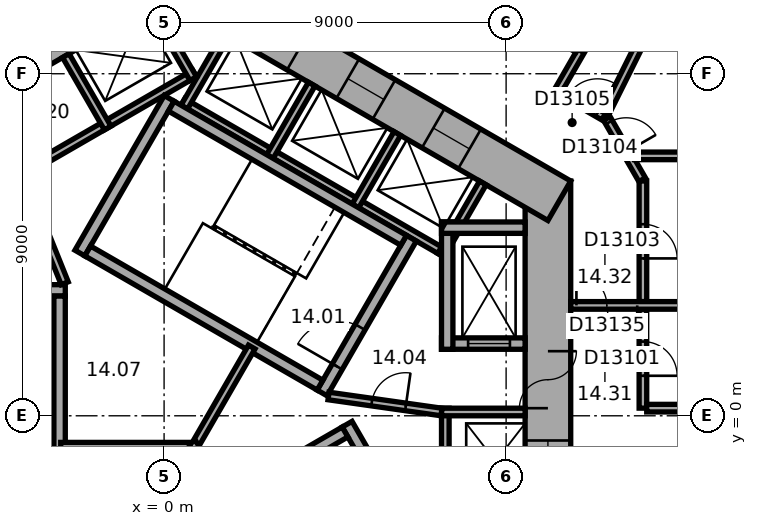
"""IFC4 building model, lengths in metres.
Left out: names, types, materials, properties, quantities, classifications, styles, units other than length and angle.
Written with IfcOpenShell. Run it as: python <this file> out.ifc"""

import sys

from ifc_helpers import new_model, si_unit, direction, frame, frame_2d, origin, place, context, subcontext, project, spatial, rectangle, extrude, element, fill, save


model = new_model("IFC4")
c1 = context("Model", 3, precision=1e-05, world=origin(), true_north=direction((0.0, 1.0)))
c2 = subcontext(c1, "Body", "Model", "MODEL_VIEW")
j1 = project(units=[si_unit("LENGTHUNIT", "METRE"), si_unit("PLANEANGLEUNIT", "RADIAN")], contexts=[c1])
p1 = place(None, origin())
s1 = spatial("IfcSite", under=j1, at=p1, CompositionType="ELEMENT")
p2 = place(p1, origin())
s2 = spatial("IfcBuilding", under=s1, at=p2, CompositionType="ELEMENT")
p3 = place(p2, frame((0.0, 0.0, 67.1)))
s3 = spatial("IfcBuildingStorey", under=s2, at=p3, CompositionType="ELEMENT", Elevation=67.1)
p4 = place(p3, frame((10.1, -6.177, 0.0), z_axis=(0.0, 0.0, 1.0), x_axis=(0.0, 1.0, 0.0)))
e1 = element("IfcWall", 1, at=p4, inside=s3, PredefinedType="SHEAR", context=c2, shape_type="SweptSolid", body=[
    extrude(rectangle(XDim=12.355, YDim=1.2, at=frame_2d((6.177, 0.0))), origin(), (0.0, 0.0, 1.0), 3.3),
])
p5 = place(p4, frame((6.378, 0.0, 0.0)))
e2 = element("IfcOpeningElement", 2, at=p5, cuts=e1, PredefinedType="OPENING", context=c2, shape_type="SweptSolid", body=[
    extrude(rectangle(XDim=1.5, YDim=2.1, at=frame_2d((0.75, 1.05))), frame((0.0, 0.61, 0.0), z_axis=(0.0, -1.0, 0.0), x_axis=(1.0, 0.0, 0.0)), (0.0, 0.0, 1.0), 1.22),
])
p6 = place(p4, frame((1.828, 0.0, 0.0)))
e3 = element("IfcOpeningElement", 3, at=p6, cuts=e1, PredefinedType="OPENING", context=c2, shape_type="SweptSolid", body=[
    extrude(rectangle(XDim=1.1, YDim=2.1, at=frame_2d((0.55, 1.05))), frame((0.0, 0.61, 0.0), z_axis=(0.0, -1.0, 0.0), x_axis=(1.0, 0.0, 0.0)), (0.0, 0.0, 1.0), 1.22),
])
p7 = place(p4, frame((4.427, 0.0, 0.0)))
e4 = element("IfcOpeningElement", 4, at=p7, cuts=e1, PredefinedType="OPENING", context=c2, shape_type="SweptSolid", body=[
    extrude(rectangle(XDim=1.1, YDim=2.1, at=frame_2d((0.55, 1.05))), frame((0.0, 0.61, 0.0), z_axis=(0.0, -1.0, 0.0), x_axis=(1.0, 0.0, 0.0)), (0.0, 0.0, 1.0), 1.22),
])
p8 = place(p3, frame((10.4, 5.658, 0.0), z_axis=(0.0, 0.0, 1.0), x_axis=(-0.866021384402, 0.500006961711, 0.0)))
e5 = element("IfcWall", 5, at=p8, inside=s3, PredefinedType="SHEAR", context=c2, shape_type="SweptSolid", body=[
    extrude(rectangle(XDim=12.355, YDim=1.2, at=frame_2d((6.178, 0.0))), origin(), (0.0, 0.0, 1.0), 3.3),
])
p9 = place(p8, frame((2.728, 0.0, 0.0)))
e6 = element("IfcOpeningElement", 6, at=p9, cuts=e5, PredefinedType="OPENING", context=c2, shape_type="SweptSolid", body=[
    extrude(rectangle(XDim=1.1, YDim=2.1, at=frame_2d((0.55, 1.05))), frame((0.0, 0.61, 0.0), z_axis=(0.0, -1.0, 0.0), x_axis=(1.0, 0.0, 0.0)), (0.0, 0.0, 1.0), 1.22),
])
p10 = place(p8, frame((5.328, 0.0, 0.0)))
e7 = element("IfcOpeningElement", 7, at=p10, cuts=e5, PredefinedType="OPENING", context=c2, shape_type="SweptSolid", body=[
    extrude(rectangle(XDim=1.1, YDim=2.1, at=frame_2d((0.55, 1.05))), frame((0.0, 0.61, 0.0), z_axis=(0.0, -1.0, 0.0), x_axis=(1.0, 0.0, 0.0)), (0.0, 0.0, 1.0), 1.22),
])
p11 = place(p8, frame((7.928, 0.0, 0.0)))
e8 = element("IfcOpeningElement", 8, at=p11, cuts=e5, PredefinedType="OPENING", context=c2, shape_type="SweptSolid", body=[
    extrude(rectangle(XDim=1.1, YDim=2.1, at=frame_2d((0.55, 1.05))), frame((0.0, 0.61, 0.0), z_axis=(0.0, -1.0, 0.0), x_axis=(1.0, 0.0, 0.0)), (0.0, 0.0, 1.0), 1.22),
])
p12 = place(p3, frame((0.3, 11.836, 0.0), z_axis=(0.0, 0.0, 1.0), x_axis=(-0.866021384402, -0.500006961711, 0.0)))
e9 = element("IfcWall", 9, at=p12, inside=s3, PredefinedType="SHEAR", context=c2, shape_type="SweptSolid", body=[
    extrude(rectangle(XDim=12.355, YDim=1.2, at=frame_2d((6.178, 0.0))), origin(), (0.0, 0.0, 1.0), 3.3),
])
p13 = place(p12, frame((6.378, 0.0, 0.0)))
e10 = element("IfcOpeningElement", 10, at=p13, cuts=e9, PredefinedType="OPENING", context=c2, shape_type="SweptSolid", body=[
    extrude(rectangle(XDim=1.5, YDim=2.1, at=frame_2d((0.75, 1.05))), frame((0.0, 0.61, 0.0), z_axis=(0.0, -1.0, 0.0), x_axis=(1.0, 0.0, 0.0)), (0.0, 0.0, 1.0), 1.22),
])
p14 = place(p12, frame((1.828, 0.0, 0.0)))
e11 = element("IfcOpeningElement", 11, at=p14, cuts=e9, PredefinedType="OPENING", context=c2, shape_type="SweptSolid", body=[
    extrude(rectangle(XDim=1.1, YDim=2.1, at=frame_2d((0.55, 1.05))), frame((0.0, 0.61, 0.0), z_axis=(0.0, -1.0, 0.0), x_axis=(1.0, 0.0, 0.0)), (0.0, 0.0, 1.0), 1.22),
])
p15 = place(p3, frame((7.4, -5.2, 0.0), z_axis=(0.0, 0.0, 1.0), x_axis=(0.0, 1.0, 0.0)))
e12 = element("IfcWall", 12, at=p15, inside=s3, PredefinedType="PARTITIONING", context=c2, shape_type="SweptSolid", body=[
    extrude(rectangle(XDim=5.4, YDim=0.2, at=frame_2d((2.7, 0.0))), origin(), (0.0, 0.0, 1.0), 3.05),
])
p16 = place(p3, frame((7.3, 0.1, 0.0), z_axis=(0.0, 0.0, 1.0), x_axis=(1.0, 0.0, 0.0)))
e13 = element("IfcWall", 13, at=p16, inside=s3, PredefinedType="PARTITIONING", context=c2, shape_type="SweptSolid", body=[
    extrude(rectangle(XDim=2.2, YDim=0.2, at=frame_2d((1.1, 0.0))), origin(), (0.0, 0.0, 1.0), 3.05),
])
p17 = place(p3, frame((7.424, 4.259, 0.0), z_axis=(0.0, 0.0, 1.0), x_axis=(-0.866026010844, 0.49999894854, 0.0)))
e14 = element("IfcWall", 14, at=p17, inside=s3, PredefinedType="PARTITIONING", context=c2, shape_type="SweptSolid", body=[
    extrude(rectangle(XDim=8.0, YDim=0.2, at=frame_2d((4.0, 0.0))), origin(), (0.0, 0.0, 1.0), 3.05),
])
for number, where, z_axis, x_axis in (
    (15, (7.287, 4.222, 0.0), (0.0, 0.0, 1.0), (0.5, 0.866, 0.0)),
    (16, (5.036, 5.522, 0.0), (0.0, 0.0, 1.0), (0.5, 0.866, 0.0)),
    (17, (2.784, 6.822, 0.0), (0.0, 0.0, 1.0), (0.5, 0.866, 0.0)),
    (18, (0.532, 8.122, 0.0), (0.0, 0.0, 1.0), (0.5, 0.866, 0.0)),
):
    element("IfcWall", number, at=place(p3, frame(where, z_axis=z_axis, x_axis=x_axis)), inside=s3, PredefinedType="PARTITIONING", context=c2, shape_type="SweptSolid", body=[
        extrude(rectangle(XDim=2.2, YDim=0.2, at=frame_2d((1.1, 0.0))), origin(), (0.0, 0.0, 1.0), 3.05),
    ])
p18 = place(p3, frame((0.803, 9.009, 0.0), z_axis=(0.0, 0.0, 1.0), x_axis=(-0.866028230842, -0.499995103361, 0.0)))
e19 = element("IfcWall", 19, at=p18, inside=s3, PredefinedType="PARTITIONING", context=c2, shape_type="SweptSolid", body=[
    extrude(rectangle(XDim=5.4, YDim=0.2, at=frame_2d((2.7, 0.0))), origin(), (0.0, 0.0, 1.0), 3.05),
])
p19 = place(p3, frame((0.767, 8.872, 0.0), z_axis=(0.0, 0.0, 1.0), x_axis=(-0.499994660107, 0.866028486751, 0.0)))
e20 = element("IfcWall", 20, at=p19, inside=s3, PredefinedType="PARTITIONING", context=c2, shape_type="SweptSolid", body=[
    extrude(rectangle(XDim=2.2, YDim=0.2, at=frame_2d((1.1, 0.0))), origin(), (0.0, 0.0, 1.0), 3.05),
])
p20 = place(p3, frame((-1.485, 7.572, 0.0), z_axis=(0.0, 0.0, 1.0), x_axis=(-0.50002983664, 0.866008176907, 0.0)))
e21 = element("IfcWall", 21, at=p20, inside=s3, PredefinedType="PARTITIONING", context=c2, shape_type="SweptSolid", body=[
    extrude(rectangle(XDim=2.2, YDim=0.2, at=frame_2d((1.1, 0.0))), origin(), (0.0, 0.0, 1.0), 3.05),
])
p21 = place(p3, frame((4.158, 0.602, 0.0), z_axis=(0.0, 0.0, 1.0), x_axis=(0.499977259774, 0.866038532462, 0.0)))
e22 = element("IfcWall", 22, at=p21, inside=s3, PredefinedType="SHEAR", context=c2, shape_type="SweptSolid", body=[
    extrude(rectangle(XDim=4.7, YDim=0.3, at=frame_2d((2.35, 0.0))), origin(), (0.0, 0.0, 1.0), 3.05),
])
p22 = place(p21, frame((0.8, 0.0, 0.0)))
e23 = element("IfcOpeningElement", 23, at=p22, cuts=e22, PredefinedType="OPENING", context=c2, shape_type="SweptSolid", body=[
    extrude(rectangle(XDim=1.2, YDim=2.1, at=frame_2d((0.6, 1.05))), frame((0.0, 0.16, 0.0), z_axis=(0.0, -1.0, 0.0), x_axis=(1.0, 0.0, 0.0)), (0.0, 0.0, 1.0), 0.32),
])
p23 = place(p3, frame((-2.216, 4.282, 0.0), z_axis=(0.0, 0.0, 1.0), x_axis=(0.499977259774, 0.866038532462, 0.0)))
e24 = element("IfcWall", 24, at=p23, inside=s3, PredefinedType="SHEAR", context=c2, shape_type="SweptSolid", body=[
    extrude(rectangle(XDim=4.7, YDim=0.3, at=frame_2d((2.35, 0.0))), origin(), (0.0, 0.0, 1.0), 3.05),
])
for number, where, z_axis, x_axis in (
    (25, (4.103, 0.807, 0.0), (0.0, 0.0, 1.0), (-0.866, 0.5, 0.0)),
    (26, (6.303, 4.617, 0.0), (0.0, 0.0, 1.0), (-0.866, 0.5, 0.0)),
):
    element("IfcWall", number, at=place(p3, frame(where, z_axis=z_axis, x_axis=x_axis)), inside=s3, PredefinedType="SHEAR", context=c2, shape_type="SweptSolid", body=[
        extrude(rectangle(XDim=7.06, YDim=0.3, at=frame_2d((3.53, 0.0))), origin(), (0.0, 0.0, 1.0), 3.05),
    ])
p24 = place(p3, frame((-2.6, 3.3, 0.0), z_axis=(0.0, 0.0, 1.0), x_axis=(-1.0, 0.0, 0.0)))
e27 = element("IfcWall", 27, at=p24, inside=s3, PredefinedType="SHEAR", context=c2, shape_type="SweptSolid", body=[
    extrude(rectangle(XDim=4.7, YDim=0.3, at=frame_2d((2.35, 0.0))), origin(), (0.0, 0.0, 1.0), 3.05),
])
p25 = place(p24, frame((0.8, 0.0, 0.0)))
e28 = element("IfcOpeningElement", 28, at=p25, cuts=e27, PredefinedType="OPENING", context=c2, shape_type="SweptSolid", body=[
    extrude(rectangle(XDim=1.2, YDim=2.1, at=frame_2d((0.6, 1.05))), frame((0.0, 0.16, 0.0), z_axis=(0.0, -1.0, 0.0), x_axis=(1.0, 0.0, 0.0)), (0.0, 0.0, 1.0), 0.32),
])
p26 = place(p3, frame((-2.75, 3.15, 0.0), z_axis=(0.0, 0.0, 1.0), x_axis=(0.0, -1.0, 0.0)))
e29 = element("IfcWall", 29, at=p26, inside=s3, PredefinedType="SHEAR", context=c2, shape_type="SweptSolid", body=[
    extrude(rectangle(XDim=7.06, YDim=0.3, at=frame_2d((3.53, 0.0))), origin(), (0.0, 0.0, 1.0), 3.05),
])
p27 = place(p3, frame((4.816, -0.222, 0.0), z_axis=(0.0, 0.0, 1.0), x_axis=(0.499977259774, -0.866038532462, 0.0)))
e30 = element("IfcWall", 30, at=p27, inside=s3, PredefinedType="SHEAR", context=c2, shape_type="SweptSolid", body=[
    extrude(rectangle(XDim=4.7, YDim=0.3, at=frame_2d((2.35, 0.0))), origin(), (0.0, 0.0, 1.0), 3.05),
])
p28 = place(p3, frame((-1.353, -3.957, 0.0), z_axis=(0.0, 0.0, 1.0), x_axis=(0.866027801685, 0.499995846692, 0.0)))
e31 = element("IfcWall", 31, at=p28, inside=s3, PredefinedType="SHEAR", context=c2, shape_type="SweptSolid", body=[
    extrude(rectangle(XDim=7.06, YDim=0.3, at=frame_2d((3.53, 0.0))), origin(), (0.0, 0.0, 1.0), 3.05),
])
p29 = place(p3, frame((7.3, 1.9, 0.0), z_axis=(0.0, 0.0, 1.0), x_axis=(1.0, 0.0, 0.0)))
e32 = element("IfcWall", 32, at=p29, inside=s3, PredefinedType="SHEAR", context=c2, shape_type="SweptSolid", body=[
    extrude(rectangle(XDim=2.2, YDim=0.3, at=frame_2d((1.1, 0.0))), origin(), (0.0, 0.0, 1.0), 3.05),
])
p30 = place(p29, frame((0.7, 0.0, 0.0)))
e33 = element("IfcOpeningElement", 33, at=p30, cuts=e32, PredefinedType="OPENING", context=c2, shape_type="SweptSolid", body=[
    extrude(rectangle(XDim=1.1, YDim=2.1, at=frame_2d((0.55, 1.05))), frame((0.0, 0.16, 0.0), z_axis=(0.0, -1.0, 0.0), x_axis=(1.0, 0.0, 0.0)), (0.0, 0.0, 1.0), 0.32),
])
p31 = place(p3, frame((7.45, 1.75, 0.0), z_axis=(0.0, 0.0, 1.0), x_axis=(0.0, 1.0, 0.0)))
e34 = element("IfcWall", 34, at=p31, inside=s3, PredefinedType="SHEAR", context=c2, shape_type="SweptSolid", body=[
    extrude(rectangle(XDim=3.35, YDim=0.3, at=frame_2d((1.675, 0.0))), origin(), (0.0, 0.0, 1.0), 3.05),
])
p32 = place(p3, frame((7.3, 4.95, 0.0), z_axis=(0.0, 0.0, 1.0), x_axis=(1.0, 0.0, 0.0)))
e35 = element("IfcWall", 35, at=p32, inside=s3, PredefinedType="SHEAR", context=c2, shape_type="SweptSolid", body=[
    extrude(rectangle(XDim=2.2, YDim=0.3, at=frame_2d((1.1, 0.0))), origin(), (0.0, 0.0, 1.0), 3.05),
])
p33 = place(p3, frame((4.327, 0.521, 0.0), z_axis=(0.0, 0.0, 1.0), x_axis=(0.990124376366, -0.14019172346, 0.0)))
e36 = element("IfcWall", 36, at=p33, inside=s3, PredefinedType="PARTITIONING", context=c2, shape_type="SweptSolid", body=[
    extrude(rectangle(XDim=3.002, YDim=0.2, at=frame_2d((1.501, 0.0))), origin(), (0.0, 0.0, 1.0), 3.05),
])
p34 = place(p33, frame((1.15, 0.0, 0.0)))
e37 = element("IfcOpeningElement", 37, at=p34, cuts=e36, PredefinedType="OPENING", context=c2, shape_type="SweptSolid", body=[
    extrude(rectangle(XDim=0.9, YDim=2.1, at=frame_2d((0.45, 1.05))), frame((0.0, 0.11, 0.0), z_axis=(0.0, -1.0, 0.0), x_axis=(1.0, 0.0, 0.0)), (0.0, 0.0, 1.0), 0.22),
])
p35 = place(p3, frame((-2.615, 3.487, 0.0), z_axis=(0.0, 0.0, 1.0), x_axis=(-0.373576831041, 0.92759924068, 0.0)))
e38 = element("IfcWall", 38, at=p35, inside=s3, PredefinedType="PARTITIONING", context=c2, shape_type="SweptSolid", body=[
    extrude(rectangle(XDim=3.002, YDim=0.2, at=frame_2d((1.501, 0.0))), origin(), (0.0, 0.0, 1.0), 3.05),
])
p36 = place(p35, frame((1.15, 0.0, 0.0)))
e39 = element("IfcOpeningElement", 39, at=p36, cuts=e38, PredefinedType="OPENING", context=c2, shape_type="SweptSolid", body=[
    extrude(rectangle(XDim=0.9, YDim=2.1, at=frame_2d((0.45, 1.05))), frame((0.0, 0.11, 0.0), z_axis=(0.0, -1.0, 0.0), x_axis=(1.0, 0.0, 0.0)), (0.0, 0.0, 1.0), 0.22),
])
p37 = place(p3, frame((0.92, -0.8, 0.0), z_axis=(0.0, 0.0, 1.0), x_axis=(-1.0, 0.0, 0.0)))
e40 = element("IfcWall", 40, at=p37, inside=s3, PredefinedType="PARTITIONING", context=c2, shape_type="SweptSolid", body=[
    extrude(rectangle(XDim=3.64, YDim=0.2, at=frame_2d((1.82, 0.0))), origin(), (0.0, 0.0, 1.0), 3.05),
])
p38 = place(p3, frame((0.74, -0.904, 0.0), z_axis=(0.0, 0.0, 1.0), x_axis=(0.500028278809, 0.866009076391, 0.0)))
e41 = element("IfcWall", 41, at=p38, inside=s3, PredefinedType="PARTITIONING", context=c2, shape_type="SweptSolid", body=[
    extrude(rectangle(XDim=3.133, YDim=0.2, at=frame_2d((1.566, 0.0))), origin(), (0.0, 0.0, 1.0), 3.05),
])
p39 = place(p3, frame((0.74, -0.696, 0.0), z_axis=(0.0, 0.0, 1.0), x_axis=(0.499956301907, -0.86605063142, 0.0)))
e42 = element("IfcWall", 42, at=p39, inside=s3, PredefinedType="PARTITIONING", context=c2, shape_type="SweptSolid", body=[
    extrude(rectangle(XDim=1.747, YDim=0.2, at=frame_2d((0.874, 0.0))), origin(), (0.0, 0.0, 1.0), 3.05),
])
p40 = place(p3, frame((10.371, 8.561, 0.0), z_axis=(0.0, 0.0, 1.0), x_axis=(0.499986357472, 0.866033280158, 0.0)))
e43 = element("IfcWall", 43, at=p40, inside=s3, PredefinedType="PARTITIONING", context=c2, shape_type="SweptSolid", body=[
    extrude(rectangle(XDim=1.201, YDim=0.2, at=frame_2d((0.601, 0.0))), origin(), (0.0, 0.0, 1.0), 3.05),
])
p41 = place(p3, frame((11.566, 7.871, 0.0), z_axis=(0.0, 0.0, 1.0), x_axis=(-0.866004557827, 0.500036104519, 0.0)))
e44 = element("IfcWall", 44, at=p41, inside=s3, PredefinedType="PARTITIONING", context=c2, shape_type="SweptSolid", body=[
    extrude(rectangle(XDim=1.28, YDim=0.2, at=frame_2d((0.64, 0.0))), origin(), (0.0, 0.0, 1.0), 3.05),
])
p42 = place(p41, frame((0.19, 0.0, 0.0)))
e45 = element("IfcOpeningElement", 45, at=p42, cuts=e44, PredefinedType="OPENING", context=c2, shape_type="SweptSolid", body=[
    extrude(rectangle(XDim=0.9, YDim=2.1, at=frame_2d((0.45, 1.05))), frame((0.0, 0.11, 0.0), z_axis=(0.0, -1.0, 0.0), x_axis=(1.0, 0.0, 0.0)), (0.0, 0.0, 1.0), 0.22),
])
p43 = place(p3, frame((12.58, 6.212, 0.0), z_axis=(0.0, 0.0, 1.0), x_axis=(-0.500063286585, 0.865988862174, 0.0)))
e46 = element("IfcWall", 46, at=p43, inside=s3, PredefinedType="PARTITIONING", context=c2, shape_type="SweptSolid", body=[
    extrude(rectangle(XDim=1.86, YDim=0.2, at=frame_2d((0.93, 0.0))), origin(), (0.0, 0.0, 1.0), 3.05),
])
p44 = place(p43, frame((0.842, 0.0, 0.0)))
e47 = element("IfcOpeningElement", 47, at=p44, cuts=e46, PredefinedType="OPENING", context=c2, shape_type="SweptSolid", body=[
    extrude(rectangle(XDim=0.9, YDim=2.1, at=frame_2d((0.45, 1.05))), frame((0.0, 0.11, 0.0), z_axis=(0.0, -1.0, 0.0), x_axis=(1.0, 0.0, 0.0)), (0.0, 0.0, 1.0), 0.22),
])
p45 = place(p3, frame((12.6, 0.201, 0.0), z_axis=(0.0, 0.0, 1.0), x_axis=(0.0, 1.0, 0.0)))
e48 = element("IfcWall", 48, at=p45, inside=s3, PredefinedType="PARTITIONING", context=c2, shape_type="SweptSolid", body=[
    extrude(rectangle(XDim=2.604, YDim=0.2, at=frame_2d((1.302, 0.0))), origin(), (0.0, 0.0, 1.0), 3.05),
])
p46 = place(p45, frame((0.852, 0.0, 0.0)))
e49 = element("IfcOpeningElement", 49, at=p46, cuts=e48, PredefinedType="OPENING", context=c2, shape_type="SweptSolid", body=[
    extrude(rectangle(XDim=0.9, YDim=2.1, at=frame_2d((0.45, 1.05))), frame((0.0, 0.11, 0.0), z_axis=(0.0, -1.0, 0.0), x_axis=(1.0, 0.0, 0.0)), (0.0, 0.0, 1.0), 0.22),
])
p47 = place(p3, frame((12.6, 3.004, 0.0), z_axis=(0.0, 0.0, 1.0), x_axis=(0.0, 1.0, 0.0)))
e50 = element("IfcWall", 50, at=p47, inside=s3, PredefinedType="PARTITIONING", context=c2, shape_type="SweptSolid", body=[
    extrude(rectangle(XDim=3.173, YDim=0.2, at=frame_2d((1.586, 0.0))), origin(), (0.0, 0.0, 1.0), 3.05),
])
p48 = place(p47, frame((1.136, 0.0, 0.0)))
e51 = element("IfcOpeningElement", 51, at=p48, cuts=e50, PredefinedType="OPENING", context=c2, shape_type="SweptSolid", body=[
    extrude(rectangle(XDim=0.9, YDim=2.1, at=frame_2d((0.45, 1.05))), frame((0.0, 0.11, 0.0), z_axis=(0.0, -1.0, 0.0), x_axis=(1.0, 0.0, 0.0)), (0.0, 0.0, 1.0), 0.22),
])
p49 = place(p3, frame((13.701, 0.201, 0.0), z_axis=(0.0, 0.0, 1.0), x_axis=(-1.0, 0.0, 0.0)))
e52 = element("IfcWall", 52, at=p49, inside=s3, PredefinedType="PARTITIONING", context=c2, shape_type="SweptSolid", body=[
    extrude(rectangle(XDim=1.001, YDim=0.2, at=frame_2d((0.5, 0.0))), origin(), (0.0, 0.0, 1.0), 3.05),
])
p50 = place(p3, frame((15.915, 16.592, 0.0), z_axis=(0.0, 0.0, 1.0), x_axis=(-0.446199736347, -0.894933402709, 0.0)))
e53 = element("IfcWall", 53, at=p50, inside=s3, PredefinedType="PARTITIONING", context=c2, shape_type="SweptSolid", body=[
    extrude(rectangle(XDim=9.635, YDim=0.2, at=frame_2d((4.817, 0.0))), origin(), (0.0, 0.0, 1.0), 3.05),
])
p51 = place(p3, frame((21.95, 2.905, 0.0), z_axis=(0.0, 0.0, 1.0), x_axis=(-1.0, 0.0, 0.0)))
e54 = element("IfcWall", 54, at=p51, inside=s3, PredefinedType="PARTITIONING", context=c2, shape_type="SweptSolid", body=[
    extrude(rectangle(XDim=11.25, YDim=0.2, at=frame_2d((5.625, 0.0))), origin(), (0.0, 0.0, 1.0), 3.05),
])
p52 = place(p51, frame((9.5, 0.0, 0.0)))
e55 = element("IfcOpeningElement", 55, at=p52, cuts=e54, PredefinedType="OPENING", context=c2, shape_type="SweptSolid", body=[
    extrude(rectangle(XDim=1.6, YDim=2.1, at=frame_2d((0.8, 1.05))), frame((0.0, 0.11, 0.0), z_axis=(0.0, -1.0, 0.0), x_axis=(1.0, 0.0, 0.0)), (0.0, 0.0, 1.0), 0.22),
])
p53 = place(p3, frame((21.95, 6.839, 0.0), z_axis=(0.0, 0.0, 1.0), x_axis=(-1.0, 0.0, 0.0)))
e56 = element("IfcWall", 56, at=p53, inside=s3, PredefinedType="PARTITIONING", context=c2, shape_type="SweptSolid", body=[
    extrude(rectangle(XDim=9.572, YDim=0.2, at=frame_2d((4.786, 0.0))), origin(), (0.0, 0.0, 1.0), 3.05),
])
p54 = place(p5, origin())
e57 = element("IfcDoor", 57, at=p54, inside=s3, OperationType="DOUBLE_DOOR_SINGLE_SWING", PredefinedType="DOOR", context=c2, shape_type="SweptSolid", body=[
    extrude(rectangle(XDim=1.5, YDim=2.1, at=frame_2d((0.75, 1.05))), frame((0.0, 0.025, 0.0), z_axis=(0.0, -1.0, 0.0), x_axis=(1.0, 0.0, 0.0)), (0.0, 0.0, 1.0), 0.05),
])
fill(e2, e57)
p55 = place(p22, origin())
e58 = element("IfcDoor", 58, at=p55, inside=s3, OperationType="SINGLE_SWING_RIGHT", PredefinedType="DOOR", context=c2, shape_type="SweptSolid", body=[
    extrude(rectangle(XDim=1.2, YDim=2.1, at=frame_2d((0.6, 1.05))), frame((0.0, 0.025, 0.0), z_axis=(0.0, -1.0, 0.0), x_axis=(1.0, 0.0, 0.0)), (0.0, 0.0, 1.0), 0.05),
])
fill(e23, e58)
p56 = place(p34, origin())
e59 = element("IfcDoor", 59, at=p56, inside=s3, OperationType="SINGLE_SWING_LEFT", PredefinedType="DOOR", context=c2, shape_type="SweptSolid", body=[
    extrude(rectangle(XDim=0.9, YDim=2.1, at=frame_2d((0.45, 1.05))), frame((0.0, 0.025, 0.0), z_axis=(0.0, -1.0, 0.0), x_axis=(1.0, 0.0, 0.0)), (0.0, 0.0, 1.0), 0.05),
])
fill(e37, e59)
p57 = place(p30, origin())
e60 = element("IfcDoor", 60, at=p57, inside=s3, OperationType="DOUBLE_DOOR_SLIDING", PredefinedType="DOOR", context=c2, shape_type="SweptSolid", body=[
    extrude(rectangle(XDim=1.1, YDim=2.1, at=frame_2d((0.55, 1.05))), frame((0.0, 0.025, 0.0), z_axis=(0.0, -1.0, 0.0), x_axis=(1.0, 0.0, 0.0)), (0.0, 0.0, 1.0), 0.05),
])
fill(e33, e60)
p58 = place(p7, origin())
e61 = element("IfcDoor", 61, at=p58, inside=s3, OperationType="DOUBLE_DOOR_SLIDING", PredefinedType="DOOR", context=c2, shape_type="SweptSolid", body=[
    extrude(rectangle(XDim=1.1, YDim=2.1, at=frame_2d((0.55, 1.05))), frame((0.0, 0.025, 0.0), z_axis=(0.0, -1.0, 0.0), x_axis=(1.0, 0.0, 0.0)), (0.0, 0.0, 1.0), 0.05),
])
fill(e4, e61)
p59 = place(p9, origin())
e62 = element("IfcDoor", 62, at=p59, inside=s3, OperationType="DOUBLE_DOOR_SLIDING", PredefinedType="DOOR", context=c2, shape_type="SweptSolid", body=[
    extrude(rectangle(XDim=1.1, YDim=2.1, at=frame_2d((0.55, 1.05))), frame((0.0, 0.025, 0.0), z_axis=(0.0, -1.0, 0.0), x_axis=(1.0, 0.0, 0.0)), (0.0, 0.0, 1.0), 0.05),
])
fill(e6, e62)
p60 = place(p10, origin())
e63 = element("IfcDoor", 63, at=p60, inside=s3, OperationType="DOUBLE_DOOR_SLIDING", PredefinedType="DOOR", context=c2, shape_type="SweptSolid", body=[
    extrude(rectangle(XDim=1.1, YDim=2.1, at=frame_2d((0.55, 1.05))), frame((0.0, 0.025, 0.0), z_axis=(0.0, -1.0, 0.0), x_axis=(1.0, 0.0, 0.0)), (0.0, 0.0, 1.0), 0.05),
])
fill(e7, e63)
p61 = place(p46, origin())
e64 = element("IfcDoor", 64, at=p61, inside=s3, OperationType="SINGLE_SWING_LEFT", PredefinedType="DOOR", context=c2, shape_type="SweptSolid", body=[
    extrude(rectangle(XDim=0.9, YDim=2.1, at=frame_2d((0.45, 1.05))), frame((0.0, 0.025, 0.0), z_axis=(0.0, -1.0, 0.0), x_axis=(1.0, 0.0, 0.0)), (0.0, 0.0, 1.0), 0.05),
])
fill(e49, e64)
p62 = place(p48, origin())
e65 = element("IfcDoor", 65, at=p62, inside=s3, OperationType="SINGLE_SWING_LEFT", PredefinedType="DOOR", context=c2, shape_type="SweptSolid", body=[
    extrude(rectangle(XDim=0.9, YDim=2.1, at=frame_2d((0.45, 1.05))), frame((0.0, 0.025, 0.0), z_axis=(0.0, -1.0, 0.0), x_axis=(1.0, 0.0, 0.0)), (0.0, 0.0, 1.0), 0.05),
])
fill(e51, e65)
p63 = place(p44, origin())
e66 = element("IfcDoor", 66, at=p63, inside=s3, OperationType="SINGLE_SWING_LEFT", PredefinedType="DOOR", context=c2, shape_type="SweptSolid", body=[
    extrude(rectangle(XDim=0.9, YDim=2.1, at=frame_2d((0.45, 1.05))), frame((0.0, 0.025, 0.0), z_axis=(0.0, -1.0, 0.0), x_axis=(1.0, 0.0, 0.0)), (0.0, 0.0, 1.0), 0.05),
])
fill(e47, e66)
p64 = place(p42, origin())
e67 = element("IfcDoor", 67, at=p64, inside=s3, OperationType="SINGLE_SWING_LEFT", PredefinedType="DOOR", context=c2, shape_type="SweptSolid", body=[
    extrude(rectangle(XDim=0.9, YDim=2.1, at=frame_2d((0.45, 1.05))), frame((0.0, 0.025, 0.0), z_axis=(0.0, -1.0, 0.0), x_axis=(1.0, 0.0, 0.0)), (0.0, 0.0, 1.0), 0.05),
])
fill(e45, e67)
p65 = place(p52, origin())
e68 = element("IfcDoor", 68, at=p65, inside=s3, OperationType="DOUBLE_DOOR_SINGLE_SWING", PredefinedType="DOOR", context=c2, shape_type="SweptSolid", body=[
    extrude(rectangle(XDim=1.6, YDim=2.1, at=frame_2d((0.8, 1.05))), frame((0.0, 0.025, 0.0), z_axis=(0.0, -1.0, 0.0), x_axis=(1.0, 0.0, 0.0)), (0.0, 0.0, 1.0), 0.05),
])
fill(e55, e68)
save(model, sys.argv[1])
